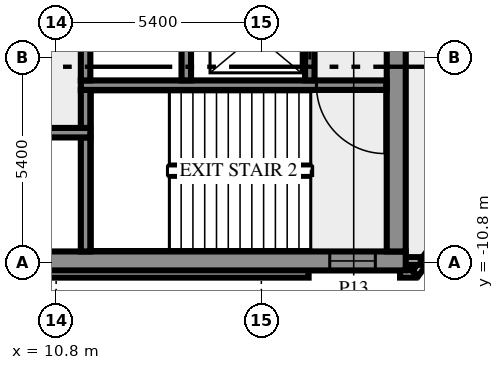
"""IFC4 building model, lengths in metres.
Left out: names, types, materials, properties, quantities, classifications, styles, units other than length and angle.
Written with IfcOpenShell. Run it as: python <this file> out.ifc"""

import sys

from ifc_helpers import new_model, si_unit, direction, frame, frame_2d, origin, place, context, subcontext, project, spatial, rectangle, extrude, element, fill, save


model = new_model("IFC4")
c1 = context("Model", 3, precision=1e-05, world=origin(), true_north=direction((0.0, 1.0)))
c2 = subcontext(c1, "Body", "Model", "MODEL_VIEW")
j1 = project(units=[si_unit("LENGTHUNIT", "METRE"), si_unit("PLANEANGLEUNIT", "RADIAN")], contexts=[c1])
p1 = place(None, origin())
s1 = spatial("IfcSite", under=j1, at=p1, CompositionType="ELEMENT")
p2 = place(p1, origin())
s2 = spatial("IfcBuilding", under=s1, at=p2, CompositionType="ELEMENT")
p3 = place(p2, frame((0.0, 0.0, 101.0)))
s3 = spatial("IfcBuildingStorey", under=s2, at=p3, CompositionType="ELEMENT", Elevation=101.0)
p4 = place(p3, frame((-17.444, -11.088, 0.0), z_axis=(0.0, 0.0, 1.0), x_axis=(1.0, 0.0, 0.0)))
e1 = element("IfcWall", 1, at=p4, inside=s3, PredefinedType="SOLIDWALL", context=c2, shape_type="SweptSolid", body=[
    extrude(rectangle(XDim=34.888, YDim=0.2, at=frame_2d((17.444, 0.0))), origin(), (0.0, 0.0, 1.0), 3.65),
])
p5 = place(p3, frame((19.85, -11.088, 0.0), z_axis=(0.0, 0.0, 1.0), x_axis=(1.0, 0.0, 0.0)))
e2 = element("IfcWall", 2, at=p5, inside=s3, PredefinedType="SOLIDWALL", context=c2, shape_type="SweptSolid", body=[
    extrude(rectangle(XDim=0.406, YDim=0.2, at=frame_2d((0.203, 0.0))), origin(), (0.0, 0.0, 1.0), 3.65),
])
p6 = place(p3, frame((20.253, -11.083, 0.0), z_axis=(0.0, 0.0, 1.0), x_axis=(0.587766567315, 0.809030569476, 0.0)))
e3 = element("IfcWall", 3, at=p6, inside=s3, PredefinedType="SOLIDWALL", context=c2, shape_type="SweptSolid", body=[
    extrude(rectangle(XDim=2.688, YDim=0.2, at=frame_2d((1.344, 0.0))), origin(), (0.0, 0.0, 1.0), 3.65),
])
p7 = place(p3, frame((19.98, -10.75, 0.0), z_axis=(0.0, 0.0, 1.0), x_axis=(1.0, 0.0, 0.0)))
e4 = element("IfcWall", 4, at=p7, inside=s3, PredefinedType="SOLIDWALL", context=c2, shape_type="SweptSolid", body=[
    extrude(rectangle(XDim=0.417, YDim=0.2, at=frame_2d((0.208, 0.0))), origin(), (0.0, 0.0, 1.0), 3.65),
])
p8 = place(p3, frame((-20.0, -10.75, 0.0), z_axis=(0.0, 0.0, 1.0), x_axis=(1.0, 0.0, 0.0)))
e5 = element("IfcWall", 5, at=p8, inside=s3, PredefinedType="SHEAR", context=c2, shape_type="SweptSolid", body=[
    extrude(rectangle(XDim=40.0, YDim=0.5, at=frame_2d((20.0, 0.0))), origin(), (0.0, 0.0, 1.0), 3.65),
])
p9 = place(p8, frame((0.8, 0.0, 1.0)))
e6 = element("IfcOpeningElement", 6, at=p9, cuts=e5, PredefinedType="OPENING", context=c2, shape_type="SweptSolid", body=[
    extrude(rectangle(XDim=1.2, YDim=1.2, at=frame_2d((0.6, 0.6))), frame((0.0, 0.26, 0.0), z_axis=(0.0, -1.0, 0.0), x_axis=(1.0, 0.0, 0.0)), (0.0, 0.0, 1.0), 0.52),
])
p10 = place(p8, frame((38.0, 0.0, 1.0)))
e7 = element("IfcOpeningElement", 7, at=p10, cuts=e5, PredefinedType="OPENING", context=c2, shape_type="SweptSolid", body=[
    extrude(rectangle(XDim=1.2, YDim=1.2, at=frame_2d((0.6, 0.6))), frame((0.0, 0.26, 0.0), z_axis=(0.0, -1.0, 0.0), x_axis=(1.0, 0.0, 0.0)), (0.0, 0.0, 1.0), 0.52),
])
p11 = place(p3, frame((11.575, -10.5, 0.0), z_axis=(0.0, 0.0, 1.0), x_axis=(0.0, 1.0, 0.0)))
e8 = element("IfcWall", 8, at=p11, inside=s3, PredefinedType="SHEAR", context=c2, shape_type="SweptSolid", body=[
    extrude(rectangle(XDim=3.0, YDim=0.25, at=frame_2d((1.5, 0.0))), origin(), (0.0, 0.0, 1.0), 3.65),
])
p12 = place(p3, frame((19.75, -10.5, 0.0), z_axis=(0.0, 0.0, 1.0), x_axis=(0.0, 1.0, 0.0)))
e9 = element("IfcWall", 9, at=p12, inside=s3, PredefinedType="SHEAR", context=c2, shape_type="SweptSolid", body=[
    extrude(rectangle(XDim=8.8, YDim=0.5, at=frame_2d((4.4, 0.0))), origin(), (0.0, 0.0, 1.0), 3.65),
])
p13 = place(p3, frame((11.7, -7.375, 0.0), z_axis=(0.0, 0.0, 1.0), x_axis=(-1.0, 0.0, 0.0)))
e10 = element("IfcWall", 10, at=p13, inside=s3, PredefinedType="SHEAR", context=c2, shape_type="SweptSolid", body=[
    extrude(rectangle(XDim=23.4, YDim=0.25, at=frame_2d((11.7, 0.0))), origin(), (0.0, 0.0, 1.0), 3.65),
])
p14 = place(p13, frame((21.45, 0.0, 0.0)))
e11 = element("IfcOpeningElement", 11, at=p14, cuts=e10, PredefinedType="OPENING", context=c2, shape_type="SweptSolid", body=[
    extrude(rectangle(XDim=1.1, YDim=2.1, at=frame_2d((0.55, 1.05))), frame((0.0, 0.135, 0.0), z_axis=(0.0, -1.0, 0.0), x_axis=(1.0, 0.0, 0.0)), (0.0, 0.0, 1.0), 0.27),
])
p15 = place(p13, frame((18.95, 0.0, 0.0)))
e12 = element("IfcOpeningElement", 12, at=p15, cuts=e10, PredefinedType="OPENING", context=c2, shape_type="SweptSolid", body=[
    extrude(rectangle(XDim=1.1, YDim=2.1, at=frame_2d((0.55, 1.05))), frame((0.0, 0.135, 0.0), z_axis=(0.0, -1.0, 0.0), x_axis=(1.0, 0.0, 0.0)), (0.0, 0.0, 1.0), 0.27),
])
p16 = place(p13, frame((16.45, 0.0, 0.0)))
e13 = element("IfcOpeningElement", 13, at=p16, cuts=e10, PredefinedType="OPENING", context=c2, shape_type="SweptSolid", body=[
    extrude(rectangle(XDim=1.1, YDim=2.1, at=frame_2d((0.55, 1.05))), frame((0.0, 0.135, 0.0), z_axis=(0.0, -1.0, 0.0), x_axis=(1.0, 0.0, 0.0)), (0.0, 0.0, 1.0), 0.27),
])
p17 = place(p13, frame((14.65, 0.0, 0.0)))
e14 = element("IfcOpeningElement", 14, at=p17, cuts=e10, PredefinedType="OPENING", context=c2, shape_type="SweptSolid", body=[
    extrude(rectangle(XDim=0.8, YDim=2.1, at=frame_2d((0.4, 1.05))), frame((0.0, 0.135, 0.0), z_axis=(0.0, -1.0, 0.0), x_axis=(1.0, 0.0, 0.0)), (0.0, 0.0, 1.0), 0.27),
])
p18 = place(p13, frame((12.8, 0.0, 0.0)))
e15 = element("IfcOpeningElement", 15, at=p18, cuts=e10, PredefinedType="OPENING", context=c2, shape_type="SweptSolid", body=[
    extrude(rectangle(XDim=0.9, YDim=2.1, at=frame_2d((0.45, 1.05))), frame((0.0, 0.135, 0.0), z_axis=(0.0, -1.0, 0.0), x_axis=(1.0, 0.0, 0.0)), (0.0, 0.0, 1.0), 0.27),
])
p19 = place(p13, frame((10.7, 0.0, 0.0)))
e16 = element("IfcOpeningElement", 16, at=p19, cuts=e10, PredefinedType="OPENING", context=c2, shape_type="SweptSolid", body=[
    extrude(rectangle(XDim=0.9, YDim=2.1, at=frame_2d((0.45, 1.05))), frame((0.0, 0.135, 0.0), z_axis=(0.0, -1.0, 0.0), x_axis=(1.0, 0.0, 0.0)), (0.0, 0.0, 1.0), 0.27),
])
p20 = place(p3, frame((11.575, -7.25, 0.0), z_axis=(0.0, 0.0, 1.0), x_axis=(0.0, 1.0, 0.0)))
e17 = element("IfcWall", 17, at=p20, inside=s3, PredefinedType="SHEAR", context=c2, shape_type="SweptSolid", body=[
    extrude(rectangle(XDim=1.0, YDim=0.25, at=frame_2d((0.5, 0.0))), origin(), (0.0, 0.0, 1.0), 3.65),
])
p21 = place(p3, frame((19.5, -6.125, 0.0), z_axis=(0.0, 0.0, 1.0), x_axis=(-1.0, 0.0, 0.0)))
e18 = element("IfcWall", 18, at=p21, inside=s3, PredefinedType="SHEAR", context=c2, shape_type="SweptSolid", body=[
    extrude(rectangle(XDim=8.05, YDim=0.25, at=frame_2d((4.025, 0.0))), origin(), (0.0, 0.0, 1.0), 3.65),
])
p22 = place(p21, frame((0.05, 0.0, 0.0)))
e19 = element("IfcOpeningElement", 19, at=p22, cuts=e18, PredefinedType="OPENING", context=c2, shape_type="SweptSolid", body=[
    extrude(rectangle(XDim=1.8, YDim=2.1, at=frame_2d((0.9, 1.05))), frame((0.0, 0.135, 0.0), z_axis=(0.0, -1.0, 0.0), x_axis=(1.0, 0.0, 0.0)), (0.0, 0.0, 1.0), 0.27),
])
for number, where, z_axis, x_axis in (
    (20, (11.575, -6.0, 0.0), (0.0, 0.0, 1.0), (0.0, 1.0, 0.0)),
    (21, (14.225, -6.0, 0.0), (0.0, 0.0, 1.0), (0.0, 1.0, 0.0)),
):
    element("IfcWall", number, at=place(p3, frame(where, z_axis=z_axis, x_axis=x_axis)), inside=s3, PredefinedType="SHEAR", context=c2, shape_type="SweptSolid", body=[
        extrude(rectangle(XDim=1.75, YDim=0.25, at=frame_2d((0.875, 0.0))), origin(), (0.0, 0.0, 1.0), 3.65),
    ])
p23 = place(p3, frame((17.475, -6.0, 0.0), z_axis=(0.0, 0.0, 1.0), x_axis=(0.0, 1.0, 0.0)))
e22 = element("IfcWall", 22, at=p23, inside=s3, PredefinedType="SHEAR", context=c2, shape_type="SweptSolid", body=[
    extrude(rectangle(XDim=4.3, YDim=0.25, at=frame_2d((2.15, 0.0))), origin(), (0.0, 0.0, 1.0), 3.65),
])
p24 = place(p23, frame((0.55, 0.0, 0.0)))
e23 = element("IfcOpeningElement", 23, at=p24, cuts=e22, PredefinedType="OPENING", context=c2, shape_type="SweptSolid", body=[
    extrude(rectangle(XDim=1.3, YDim=2.1, at=frame_2d((0.65, 1.05))), frame((0.0, 0.135, 0.0), z_axis=(0.0, -1.0, 0.0), x_axis=(1.0, 0.0, 0.0)), (0.0, 0.0, 1.0), 0.27),
])
p25 = place(p10, origin())
e24 = element("IfcWindow", 24, at=p25, inside=s3, PartitioningType="SINGLE_PANEL", PredefinedType="WINDOW", context=c2, shape_type="SweptSolid", body=[
    extrude(rectangle(XDim=1.2, YDim=1.2, at=frame_2d((0.6, 0.6))), frame((0.0, 0.03, 0.0), z_axis=(0.0, -1.0, 0.0), x_axis=(1.0, 0.0, 0.0)), (0.0, 0.0, 1.0), 0.06),
])
fill(e7, e24)
p26 = place(p22, origin())
e25 = element("IfcDoor", 25, at=p26, inside=s3, OperationType="DOUBLE_DOOR_SINGLE_SWING", PredefinedType="DOOR", context=c2, shape_type="SweptSolid", body=[
    extrude(rectangle(XDim=1.8, YDim=2.1, at=frame_2d((0.9, 1.05))), frame((0.0, 0.025, 0.0), z_axis=(0.0, -1.0, 0.0), x_axis=(1.0, 0.0, 0.0)), (0.0, 0.0, 1.0), 0.05),
])
fill(e19, e25)
p27 = place(p24, origin())
e26 = element("IfcDoor", 26, at=p27, inside=s3, OperationType="DOUBLE_DOOR_SLIDING", PredefinedType="DOOR", context=c2, shape_type="SweptSolid", body=[
    extrude(rectangle(XDim=1.3, YDim=2.1, at=frame_2d((0.65, 1.05))), frame((0.0, 0.025, 0.0), z_axis=(0.0, -1.0, 0.0), x_axis=(1.0, 0.0, 0.0)), (0.0, 0.0, 1.0), 0.05),
])
fill(e23, e26)
save(model, sys.argv[1])
